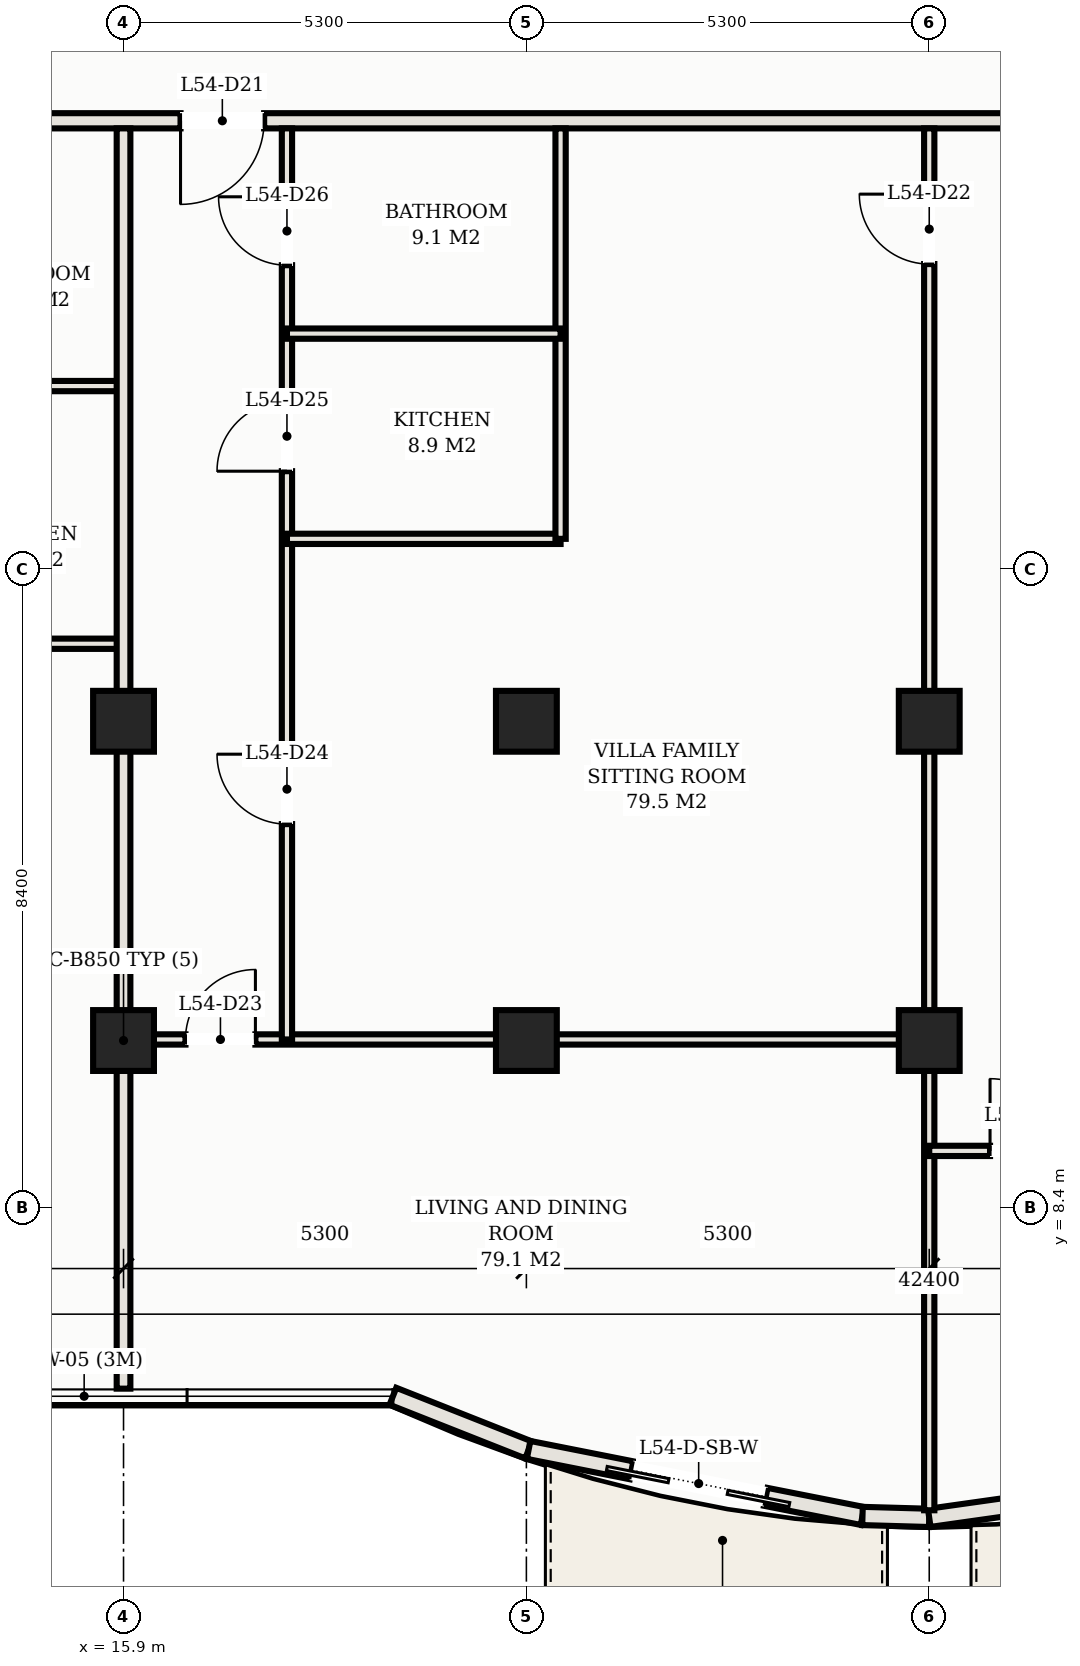
"""IFC4 building model, lengths in metres.
Left out: names, types, materials, properties, quantities, classifications, styles, units other than length and angle.
Written with IfcOpenShell. Run it as: python <this file> out.ifc"""

import sys

from ifc_helpers import new_model, si_unit, direction, frame, frame_2d, origin, origin_2d, place, context, subcontext, project, spatial, rectangle, hollow_rectangle, extrude, element, fill, save


model = new_model("IFC4")
c1 = context("Model", 3, precision=1e-05, world=origin(), true_north=direction((0.0, 1.0)))
c2 = subcontext(c1, "Body", "Model", "MODEL_VIEW")
j1 = project(units=[si_unit("LENGTHUNIT", "METRE"), si_unit("PLANEANGLEUNIT", "RADIAN")], contexts=[c1])
p1 = place(None, origin())
s1 = spatial("IfcSite", under=j1, at=p1, CompositionType="ELEMENT")
p2 = place(p1, origin())
s2 = spatial("IfcBuilding", under=s1, at=p2, CompositionType="ELEMENT")
p3 = place(p2, frame((0.0, 0.0, 200.0)))
s3 = spatial("IfcBuildingStorey", under=s2, at=p3, CompositionType="ELEMENT", Elevation=200.0)
for number, where, z_axis, x_axis in (
    (1, (15.9, 14.8, 0.0), (0.0, 0.0, 1.0), (1.0, 0.0, 0.0)),
    (2, (15.9, 10.6, 0.0), (0.0, 0.0, 1.0), (1.0, 0.0, 0.0)),
    (3, (21.2, 14.8, 0.0), (0.0, 0.0, 1.0), (1.0, 0.0, 0.0)),
    (4, (21.2, 10.6, 0.0), (0.0, 0.0, 1.0), (1.0, 0.0, 0.0)),
    (5, (26.5, 14.8, 0.0), (0.0, 0.0, 1.0), (1.0, 0.0, 0.0)),
    (6, (26.5, 10.6, 0.0), (0.0, 0.0, 1.0), (1.0, 0.0, 0.0)),
):
    element("IfcColumn", number, at=place(p3, frame(where, z_axis=z_axis, x_axis=x_axis)), inside=s3, PredefinedType="COLUMN", context=c2, shape_type="SweptSolid", body=[
        extrude(hollow_rectangle(XDim=0.8, YDim=0.8, WallThickness=0.028, at=origin_2d()), origin(), (0.0, 0.0, 1.0), 3.3),
    ])
p4 = place(p3, frame((19.444, 5.92, 0.0), z_axis=(0.0, 0.0, 1.0), x_axis=(0.92993442177, -0.367725401906, 0.0)))
e7 = element("IfcWall", 7, at=p4, inside=s3, PredefinedType="SOLIDWALL", context=c2, shape_type="SweptSolid", body=[
    extrude(rectangle(XDim=1.919, YDim=0.24, at=frame_2d((0.96, 0.0))), origin(), (0.0, 0.0, 1.0), 3.11),
])
p5 = place(p3, frame((21.229, 5.214, 0.0), z_axis=(0.0, 0.0, 1.0), x_axis=(0.980985349685, -0.194081796425, 0.0)))
e8 = element("IfcWall", 8, at=p5, inside=s3, PredefinedType="SOLIDWALL", context=c2, shape_type="SweptSolid", body=[
    extrude(rectangle(XDim=4.478, YDim=0.24, at=frame_2d((2.239, 0.0))), origin(), (0.0, 0.0, 1.0), 3.11),
])
p6 = place(p5, frame((1.381, 0.0, 0.0)))
e9 = element("IfcOpeningElement", 9, at=p6, cuts=e8, PredefinedType="OPENING", context=c2, shape_type="SweptSolid", body=[
    extrude(rectangle(XDim=1.8, YDim=2.2, at=frame_2d((0.9, 1.1))), frame((0.0, 0.13, 0.0), z_axis=(0.0, -1.0, 0.0), x_axis=(1.0, 0.0, 0.0)), (0.0, 0.0, 1.0), 0.26),
])
p7 = place(p3, frame((25.622, 4.345, 0.0), z_axis=(0.0, 0.0, 1.0), x_axis=(0.999597960231, -0.028353446035, 0.0)))
e10 = element("IfcWall", 10, at=p7, inside=s3, PredefinedType="SOLIDWALL", context=c2, shape_type="SweptSolid", body=[
    extrude(rectangle(XDim=0.878, YDim=0.24, at=frame_2d((0.439, 0.0))), origin(), (0.0, 0.0, 1.0), 3.11),
])
p8 = place(p3, frame((26.5, 4.32, 0.0), z_axis=(0.0, 0.0, 1.0), x_axis=(0.990156470874, 0.139964864115, 0.0)))
e11 = element("IfcWall", 11, at=p8, inside=s3, PredefinedType="SOLIDWALL", context=c2, shape_type="SweptSolid", body=[
    extrude(rectangle(XDim=4.436, YDim=0.24, at=frame_2d((2.218, 0.0))), origin(), (0.0, 0.0, 1.0), 3.11),
])
p9 = place(p8, frame((1.318, 0.0, 0.0)))
e12 = element("IfcOpeningElement", 12, at=p9, cuts=e11, PredefinedType="OPENING", context=c2, shape_type="SweptSolid", body=[
    extrude(rectangle(XDim=1.8, YDim=2.2, at=frame_2d((0.9, 1.1))), frame((0.0, 0.13, 0.0), z_axis=(0.0, -1.0, 0.0), x_axis=(1.0, 0.0, 0.0)), (0.0, 0.0, 1.0), 0.26),
])
p10 = place(p3, frame((6.72, 22.7, 0.0), z_axis=(0.0, 0.0, 1.0), x_axis=(1.0, 0.0, 0.0)))
e13 = element("IfcWall", 13, at=p10, inside=s3, PredefinedType="PARTITIONING", context=c2, shape_type="SweptSolid", body=[
    extrude(rectangle(XDim=39.56, YDim=0.2, at=frame_2d((19.78, 0.0))), origin(), (0.0, 0.0, 1.0), 2.43),
])
p11 = place(p10, frame((4.63, 0.0, 0.0)))
e14 = element("IfcOpeningElement", 14, at=p11, cuts=e13, PredefinedType="OPENING", context=c2, shape_type="SweptSolid", body=[
    extrude(rectangle(XDim=1.1, YDim=2.25, at=frame_2d((0.55, 1.125))), frame((0.0, 0.11, 0.0), z_axis=(0.0, -1.0, 0.0), x_axis=(1.0, 0.0, 0.0)), (0.0, 0.0, 1.0), 0.22),
])
p12 = place(p10, frame((9.93, 0.0, 0.0)))
e15 = element("IfcOpeningElement", 15, at=p12, cuts=e13, PredefinedType="OPENING", context=c2, shape_type="SweptSolid", body=[
    extrude(rectangle(XDim=1.1, YDim=2.25, at=frame_2d((0.55, 1.125))), frame((0.0, 0.11, 0.0), z_axis=(0.0, -1.0, 0.0), x_axis=(1.0, 0.0, 0.0)), (0.0, 0.0, 1.0), 0.22),
])
p13 = place(p10, frame((25.83, 0.0, 0.0)))
e16 = element("IfcOpeningElement", 16, at=p13, cuts=e13, PredefinedType="OPENING", context=c2, shape_type="SweptSolid", body=[
    extrude(rectangle(XDim=1.1, YDim=2.25, at=frame_2d((0.55, 1.125))), frame((0.0, 0.11, 0.0), z_axis=(0.0, -1.0, 0.0), x_axis=(1.0, 0.0, 0.0)), (0.0, 0.0, 1.0), 0.22),
])
p14 = place(p10, frame((1.435, 0.0, 0.0)))
e17 = element("IfcOpeningElement", 17, at=p14, cuts=e13, PredefinedType="OPENING", context=c2, shape_type="SweptSolid", body=[
    extrude(rectangle(XDim=0.92, YDim=2.15, at=frame_2d((0.46, 1.075))), frame((0.0, 0.11, 0.0), z_axis=(0.0, -1.0, 0.0), x_axis=(1.0, 0.0, 0.0)), (0.0, 0.0, 1.0), 0.22),
])
p15 = place(p10, frame((37.205, 0.0, 0.0)))
e18 = element("IfcOpeningElement", 18, at=p15, cuts=e13, PredefinedType="OPENING", context=c2, shape_type="SweptSolid", body=[
    extrude(rectangle(XDim=0.92, YDim=2.15, at=frame_2d((0.46, 1.075))), frame((0.0, 0.11, 0.0), z_axis=(0.0, -1.0, 0.0), x_axis=(1.0, 0.0, 0.0)), (0.0, 0.0, 1.0), 0.22),
])
for number, where, z_axis, x_axis in (
    (19, (12.75, 15.82, 0.0), (0.0, 0.0, 1.0), (1.0, 0.0, 0.0)),
    (20, (12.75, 19.21, 0.0), (0.0, 0.0, 1.0), (1.0, 0.0, 0.0)),
):
    element("IfcWall", number, at=place(p3, frame(where, z_axis=z_axis, x_axis=x_axis)), inside=s3, PredefinedType="PARTITIONING", context=c2, shape_type="SweptSolid", body=[
        extrude(rectangle(XDim=3.15, YDim=0.135, at=frame_2d((1.575, 0.0))), origin(), (0.0, 0.0, 1.0), 2.43),
    ])
p16 = place(p3, frame((15.9, 6.02, 0.0), z_axis=(0.0, 0.0, 1.0), x_axis=(0.0, 1.0, 0.0)))
e21 = element("IfcWall", 21, at=p16, inside=s3, PredefinedType="PARTITIONING", context=c2, shape_type="SweptSolid", body=[
    extrude(rectangle(XDim=16.58, YDim=0.18, at=frame_2d((8.29, 0.0))), origin(), (0.0, 0.0, 1.0), 2.43),
])
p17 = place(p3, frame((26.5, 4.42, 0.0), z_axis=(0.0, 0.0, 1.0), x_axis=(0.0, 1.0, 0.0)))
e22 = element("IfcWall", 22, at=p17, inside=s3, PredefinedType="PARTITIONING", context=c2, shape_type="SweptSolid", body=[
    extrude(rectangle(XDim=18.18, YDim=0.135, at=frame_2d((9.09, 0.0))), origin(), (0.0, 0.0, 1.0), 2.43),
])
p18 = place(p17, frame((16.395, 0.0, 0.0)))
e23 = element("IfcOpeningElement", 23, at=p18, cuts=e22, PredefinedType="OPENING", context=c2, shape_type="SweptSolid", body=[
    extrude(rectangle(XDim=0.92, YDim=2.15, at=frame_2d((0.46, 1.075))), frame((0.0, 0.078, 0.0), z_axis=(0.0, -1.0, 0.0), x_axis=(1.0, 0.0, 0.0)), (0.0, 0.0, 1.0), 0.155),
])
p19 = place(p3, frame((15.9, 10.614, 0.0), z_axis=(0.0, 0.0, 1.0), x_axis=(1.0, 0.0, 0.0)))
e24 = element("IfcWall", 24, at=p19, inside=s3, PredefinedType="PARTITIONING", context=c2, shape_type="SweptSolid", body=[
    extrude(rectangle(XDim=10.6, YDim=0.135, at=frame_2d((5.3, 0.0))), origin(), (0.0, 0.0, 1.0), 2.43),
])
p20 = place(p19, frame((0.815, 0.0, 0.0)))
e25 = element("IfcOpeningElement", 25, at=p20, cuts=e24, PredefinedType="OPENING", context=c2, shape_type="SweptSolid", body=[
    extrude(rectangle(XDim=0.92, YDim=2.15, at=frame_2d((0.46, 1.075))), frame((0.0, 0.078, 0.0), z_axis=(0.0, -1.0, 0.0), x_axis=(1.0, 0.0, 0.0)), (0.0, 0.0, 1.0), 0.155),
])
p21 = place(p3, frame((18.05, 10.614, 0.0), z_axis=(0.0, 0.0, 1.0), x_axis=(0.0, 1.0, 0.0)))
e26 = element("IfcWall", 26, at=p21, inside=s3, PredefinedType="PARTITIONING", context=c2, shape_type="SweptSolid", body=[
    extrude(rectangle(XDim=11.986, YDim=0.135, at=frame_2d((5.993, 0.0))), origin(), (0.0, 0.0, 1.0), 2.43),
])
p22 = place(p21, frame((2.833, 0.0, 0.0)))
e27 = element("IfcOpeningElement", 27, at=p22, cuts=e26, PredefinedType="OPENING", context=c2, shape_type="SweptSolid", body=[
    extrude(rectangle(XDim=0.92, YDim=2.15, at=frame_2d((0.46, 1.075))), frame((0.0, 0.078, 0.0), z_axis=(0.0, -1.0, 0.0), x_axis=(1.0, 0.0, 0.0)), (0.0, 0.0, 1.0), 0.155),
])
p23 = place(p21, frame((7.476, 0.0, 0.0)))
e28 = element("IfcOpeningElement", 28, at=p23, cuts=e26, PredefinedType="OPENING", context=c2, shape_type="SweptSolid", body=[
    extrude(rectangle(XDim=0.92, YDim=2.15, at=frame_2d((0.46, 1.075))), frame((0.0, 0.078, 0.0), z_axis=(0.0, -1.0, 0.0), x_axis=(1.0, 0.0, 0.0)), (0.0, 0.0, 1.0), 0.155),
])
p24 = place(p21, frame((10.186, 0.0, 0.0)))
e29 = element("IfcOpeningElement", 29, at=p24, cuts=e26, PredefinedType="OPENING", context=c2, shape_type="SweptSolid", body=[
    extrude(rectangle(XDim=0.9, YDim=2.15, at=frame_2d((0.45, 1.075))), frame((0.0, 0.078, 0.0), z_axis=(0.0, -1.0, 0.0), x_axis=(1.0, 0.0, 0.0)), (0.0, 0.0, 1.0), 0.155),
])
p25 = place(p3, frame((18.05, 17.2, 0.0), z_axis=(0.0, 0.0, 1.0), x_axis=(1.0, 0.0, 0.0)))
e30 = element("IfcWall", 30, at=p25, inside=s3, PredefinedType="PARTITIONING", context=c2, shape_type="SweptSolid", body=[
    extrude(rectangle(XDim=3.6, YDim=0.135, at=frame_2d((1.8, 0.0))), origin(), (0.0, 0.0, 1.0), 2.43),
])
p26 = place(p3, frame((21.65, 17.2, 0.0), z_axis=(0.0, 0.0, 1.0), x_axis=(0.0, 1.0, 0.0)))
e31 = element("IfcWall", 31, at=p26, inside=s3, PredefinedType="PARTITIONING", context=c2, shape_type="SweptSolid", body=[
    extrude(rectangle(XDim=5.4, YDim=0.135, at=frame_2d((2.7, 0.0))), origin(), (0.0, 0.0, 1.0), 2.43),
])
p27 = place(p3, frame((18.05, 19.9, 0.0), z_axis=(0.0, 0.0, 1.0), x_axis=(1.0, 0.0, 0.0)))
e32 = element("IfcWall", 32, at=p27, inside=s3, PredefinedType="PARTITIONING", context=c2, shape_type="SweptSolid", body=[
    extrude(rectangle(XDim=3.6, YDim=0.135, at=frame_2d((1.8, 0.0))), origin(), (0.0, 0.0, 1.0), 2.43),
])
p28 = place(p3, frame((26.5, 9.148, 0.0), z_axis=(0.0, 0.0, 1.0), x_axis=(1.0, 0.0, 0.0)))
e33 = element("IfcWall", 33, at=p28, inside=s3, PredefinedType="PARTITIONING", context=c2, shape_type="SweptSolid", body=[
    extrude(rectangle(XDim=5.3, YDim=0.135, at=frame_2d((2.65, 0.0))), origin(), (0.0, 0.0, 1.0), 2.43),
])
p29 = place(p28, frame((0.8, 0.0, 0.0)))
e34 = element("IfcOpeningElement", 34, at=p29, cuts=e33, PredefinedType="OPENING", context=c2, shape_type="SweptSolid", body=[
    extrude(rectangle(XDim=0.95, YDim=2.15, at=frame_2d((0.475, 1.075))), frame((0.0, 0.078, 0.0), z_axis=(0.0, -1.0, 0.0), x_axis=(1.0, 0.0, 0.0)), (0.0, 0.0, 1.0), 0.155),
])
p30 = place(p28, frame((3.275, 0.0, 0.0)))
e35 = element("IfcOpeningElement", 35, at=p30, cuts=e33, PredefinedType="OPENING", context=c2, shape_type="SweptSolid", body=[
    extrude(rectangle(XDim=0.9, YDim=2.15, at=frame_2d((0.45, 1.075))), frame((0.0, 0.078, 0.0), z_axis=(0.0, -1.0, 0.0), x_axis=(1.0, 0.0, 0.0)), (0.0, 0.0, 1.0), 0.155),
])
p31 = place(p6, frame((1.8, 0.0, 0.0), z_axis=(0.0, 0.0, 1.0), x_axis=(-1.0, 0.0, 0.0)))
e36 = element("IfcDoor", 36, at=p31, inside=s3, OperationType="DOUBLE_DOOR_SLIDING", PredefinedType="DOOR", context=c2, shape_type="SweptSolid", body=[
    extrude(rectangle(XDim=1.8, YDim=2.2, at=frame_2d((0.9, 1.1))), frame((0.0, 0.025, 0.0), z_axis=(0.0, -1.0, 0.0), x_axis=(1.0, 0.0, 0.0)), (0.0, 0.0, 1.0), 0.05),
])
fill(e9, e36)
p32 = place(p12, frame((1.1, 0.0, 0.0), z_axis=(0.0, 0.0, 1.0), x_axis=(-1.0, 0.0, 0.0)))
e37 = element("IfcDoor", 37, at=p32, inside=s3, OperationType="SINGLE_SWING_RIGHT", PredefinedType="DOOR", context=c2, shape_type="SweptSolid", body=[
    extrude(rectangle(XDim=1.1, YDim=2.25, at=frame_2d((0.55, 1.125))), frame((0.0, 0.025, 0.0), z_axis=(0.0, -1.0, 0.0), x_axis=(1.0, 0.0, 0.0)), (0.0, 0.0, 1.0), 0.05),
])
fill(e15, e37)
p33 = place(p18, origin())
e38 = element("IfcDoor", 38, at=p33, inside=s3, OperationType="SINGLE_SWING_RIGHT", PredefinedType="DOOR", context=c2, shape_type="SweptSolid", body=[
    extrude(rectangle(XDim=0.92, YDim=2.15, at=frame_2d((0.46, 1.075))), frame((0.0, 0.025, 0.0), z_axis=(0.0, -1.0, 0.0), x_axis=(1.0, 0.0, 0.0)), (0.0, 0.0, 1.0), 0.05),
])
fill(e23, e38)
p34 = place(p20, origin())
e39 = element("IfcDoor", 39, at=p34, inside=s3, OperationType="SINGLE_SWING_RIGHT", PredefinedType="DOOR", context=c2, shape_type="SweptSolid", body=[
    extrude(rectangle(XDim=0.92, YDim=2.15, at=frame_2d((0.46, 1.075))), frame((0.0, 0.025, 0.0), z_axis=(0.0, -1.0, 0.0), x_axis=(1.0, 0.0, 0.0)), (0.0, 0.0, 1.0), 0.05),
])
fill(e25, e39)
p35 = place(p22, origin())
e40 = element("IfcDoor", 40, at=p35, inside=s3, OperationType="SINGLE_SWING_RIGHT", PredefinedType="DOOR", context=c2, shape_type="SweptSolid", body=[
    extrude(rectangle(XDim=0.92, YDim=2.15, at=frame_2d((0.46, 1.075))), frame((0.0, 0.025, 0.0), z_axis=(0.0, -1.0, 0.0), x_axis=(1.0, 0.0, 0.0)), (0.0, 0.0, 1.0), 0.05),
])
fill(e27, e40)
p36 = place(p23, origin())
e41 = element("IfcDoor", 41, at=p36, inside=s3, OperationType="SINGLE_SWING_LEFT", PredefinedType="DOOR", context=c2, shape_type="SweptSolid", body=[
    extrude(rectangle(XDim=0.92, YDim=2.15, at=frame_2d((0.46, 1.075))), frame((0.0, 0.025, 0.0), z_axis=(0.0, -1.0, 0.0), x_axis=(1.0, 0.0, 0.0)), (0.0, 0.0, 1.0), 0.05),
])
fill(e28, e41)
p37 = place(p24, origin())
e42 = element("IfcDoor", 42, at=p37, inside=s3, OperationType="SINGLE_SWING_RIGHT", PredefinedType="DOOR", context=c2, shape_type="SweptSolid", body=[
    extrude(rectangle(XDim=0.9, YDim=2.15, at=frame_2d((0.45, 1.075))), frame((0.0, 0.025, 0.0), z_axis=(0.0, -1.0, 0.0), x_axis=(1.0, 0.0, 0.0)), (0.0, 0.0, 1.0), 0.05),
])
fill(e29, e42)
p38 = place(p29, origin())
e43 = element("IfcDoor", 43, at=p38, inside=s3, OperationType="SINGLE_SWING_LEFT", PredefinedType="DOOR", context=c2, shape_type="SweptSolid", body=[
    extrude(rectangle(XDim=0.95, YDim=2.15, at=frame_2d((0.475, 1.075))), frame((0.0, 0.025, 0.0), z_axis=(0.0, -1.0, 0.0), x_axis=(1.0, 0.0, 0.0)), (0.0, 0.0, 1.0), 0.05),
])
fill(e34, e43)
save(model, sys.argv[1])
